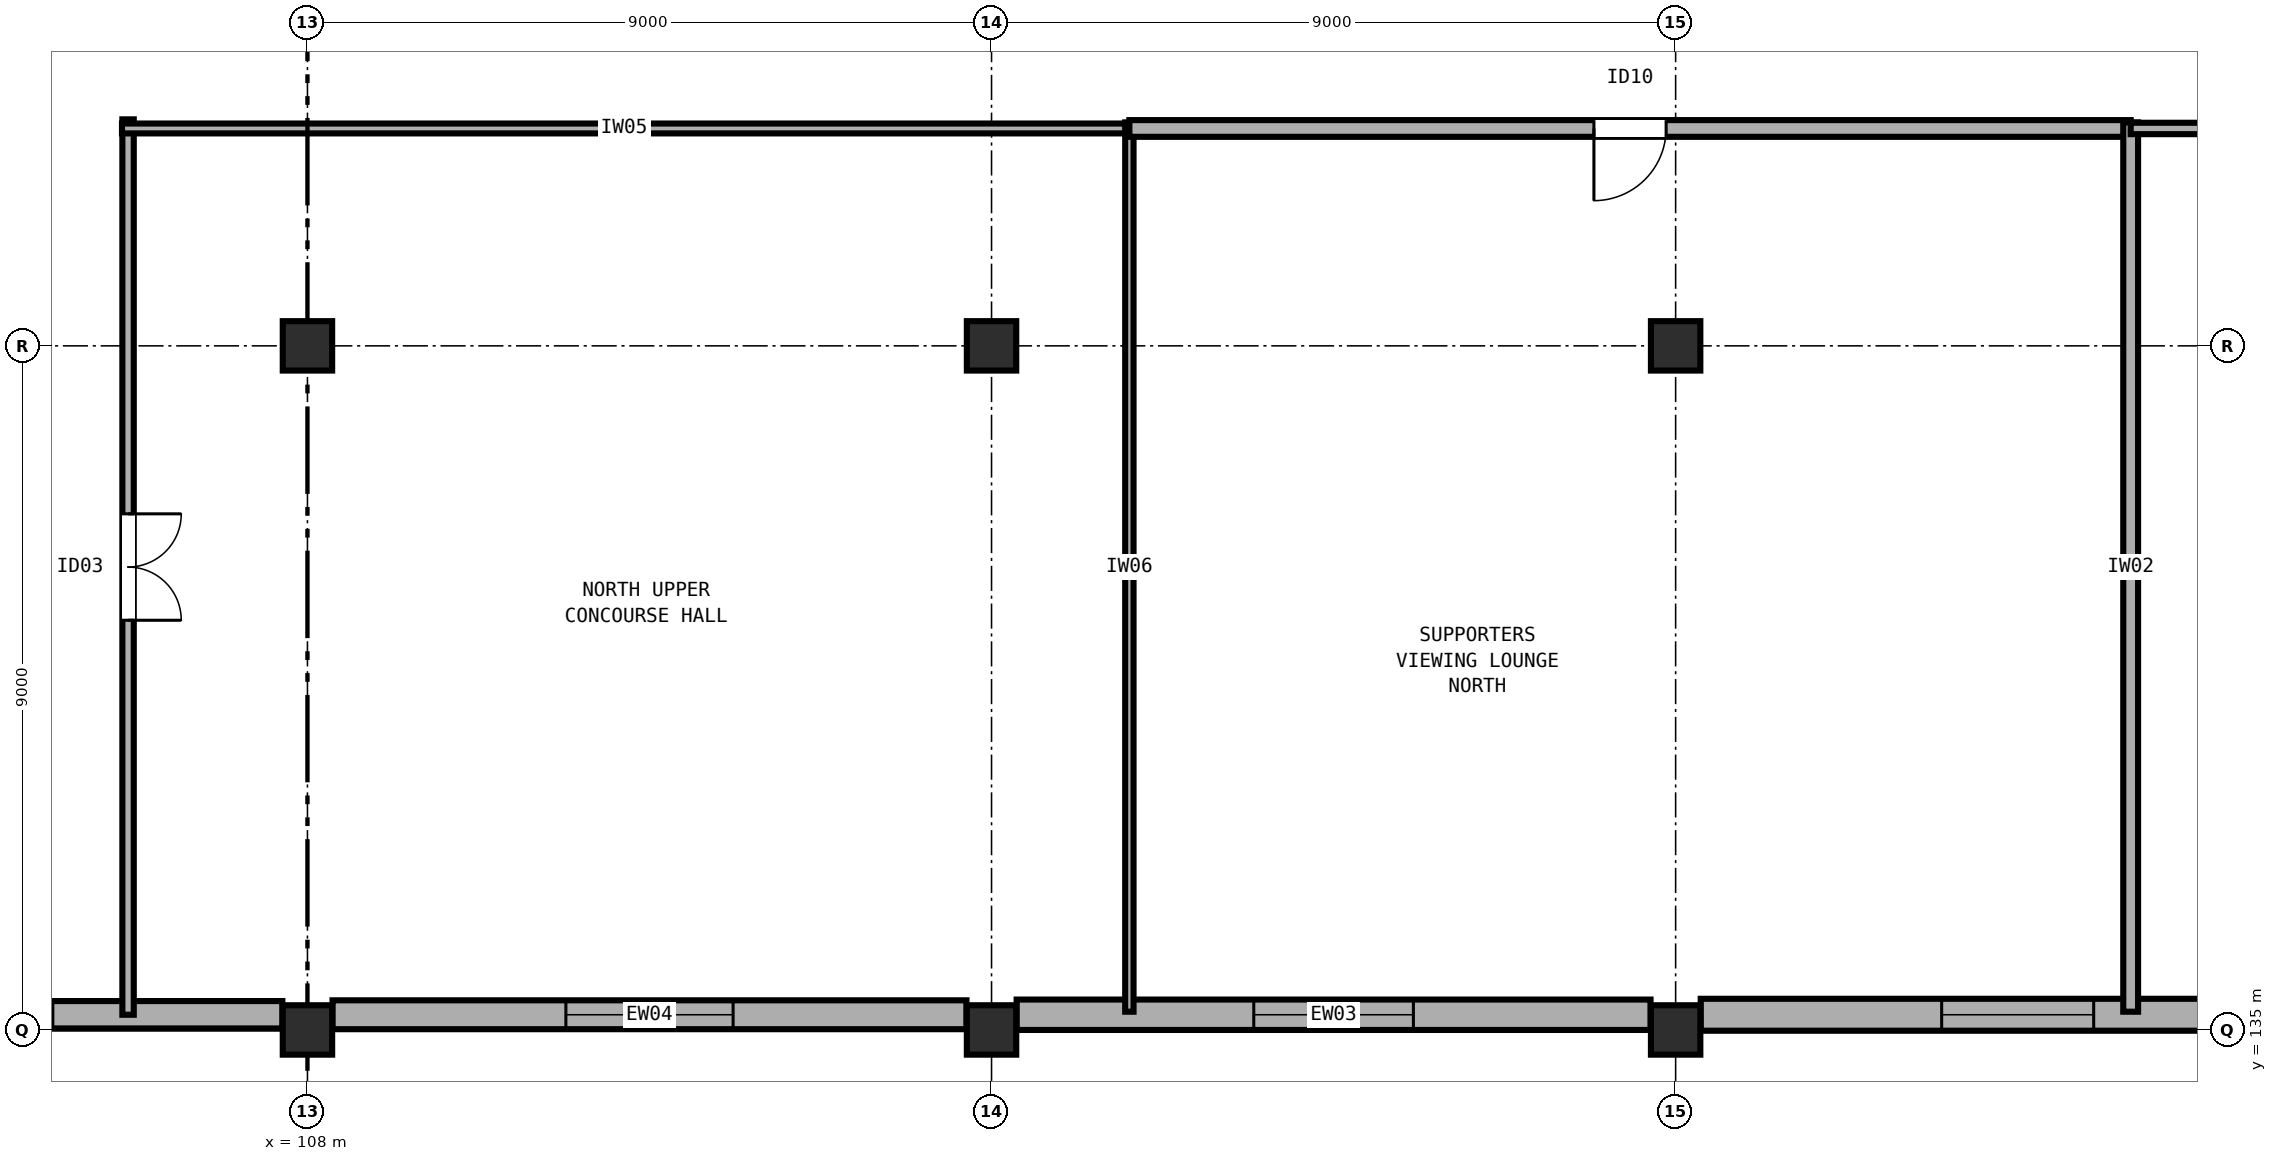
"""IFC4 building model, lengths in metres.
Left out: names, types, materials, properties, quantities, classifications, styles, units other than length and angle.
Written with IfcOpenShell. Run it as: python <this file> out.ifc"""

import sys

from ifc_helpers import new_model, si_unit, direction, frame, frame_2d, origin, origin_2d, place, context, subcontext, project, spatial, rectangle, extrude, element, fill, save


model = new_model("IFC4")
c1 = context("Model", 3, precision=1e-05, world=origin(), true_north=direction((0.0, 1.0)))
c2 = subcontext(c1, "Body", "Model", "MODEL_VIEW")
j1 = project(units=[si_unit("LENGTHUNIT", "METRE"), si_unit("PLANEANGLEUNIT", "RADIAN")], contexts=[c1])
p1 = place(None, origin())
s1 = spatial("IfcSite", under=j1, at=p1, CompositionType="ELEMENT")
p2 = place(p1, origin())
s2 = spatial("IfcBuilding", under=s1, at=p2, CompositionType="ELEMENT")
p3 = place(p2, frame((0.0, 0.0, 14.4)))
s3 = spatial("IfcBuildingStorey", under=s2, at=p3, CompositionType="ELEMENT", Elevation=14.4)
for number, where, z_axis, x_axis in (
    (1, (108.0, 135.0, 0.0), (0.0, 0.0, 1.0), (1.0, 0.0, 0.0)),
    (2, (108.0, 144.0, 0.0), (0.0, 0.0, 1.0), (1.0, 0.0, 0.0)),
    (3, (117.0, 135.0, 0.0), (0.0, 0.0, 1.0), (1.0, 0.0, 0.0)),
    (4, (117.0, 144.0, 0.0), (0.0, 0.0, 1.0), (1.0, 0.0, 0.0)),
    (5, (126.0, 135.0, 0.0), (0.0, 0.0, 1.0), (1.0, 0.0, 0.0)),
    (6, (126.0, 144.0, 0.0), (0.0, 0.0, 1.0), (1.0, 0.0, 0.0)),
):
    element("IfcColumn", number, at=place(p3, frame(where, z_axis=z_axis, x_axis=x_axis)), inside=s3, PredefinedType="COLUMN", context=c2, shape_type="SweptSolid", body=[
        extrude(rectangle(XDim=0.65, YDim=0.65, at=origin_2d()), origin(), (0.0, 0.0, 1.0), 4.8),
    ])
p4 = place(p3, frame((134.67, 135.2, 0.0), z_axis=(0.0, 0.0, 1.0), x_axis=(-1.0, 0.0, 0.0)))
e7 = element("IfcWall", 7, at=p4, inside=s3, PredefinedType="SOLIDWALL", context=c2, shape_type="SweptSolid", body=[
    extrude(rectangle(XDim=8.34, YDim=0.42, at=frame_2d((4.17, 0.0))), origin(), (0.0, 0.0, 1.0), 3.58),
])
p5 = place(p4, frame((3.17, 0.0, 0.9)))
e8 = element("IfcOpeningElement", 8, at=p5, cuts=e7, PredefinedType="OPENING", context=c2, shape_type="SweptSolid", body=[
    extrude(rectangle(XDim=2.0, YDim=1.85, at=frame_2d((1.0, 0.925))), frame((0.0, 0.22, 0.0), z_axis=(0.0, -1.0, 0.0), x_axis=(1.0, 0.0, 0.0)), (0.0, 0.0, 1.0), 0.44),
])
p6 = place(p3, frame((125.67, 135.2, 0.0), z_axis=(0.0, 0.0, 1.0), x_axis=(-1.0, 0.0, 0.0)))
e9 = element("IfcWall", 9, at=p6, inside=s3, PredefinedType="SOLIDWALL", context=c2, shape_type="SweptSolid", body=[
    extrude(rectangle(XDim=8.34, YDim=0.4, at=frame_2d((4.17, 0.0))), origin(), (0.0, 0.0, 1.0), 3.58),
])
p7 = place(p6, frame((3.12, 0.0, 0.9)))
e10 = element("IfcOpeningElement", 10, at=p7, cuts=e9, PredefinedType="OPENING", context=c2, shape_type="SweptSolid", body=[
    extrude(rectangle(XDim=2.1, YDim=1.9, at=frame_2d((1.05, 0.95))), frame((0.0, 0.21, 0.0), z_axis=(0.0, -1.0, 0.0), x_axis=(1.0, 0.0, 0.0)), (0.0, 0.0, 1.0), 0.42),
])
p8 = place(p3, frame((116.67, 135.2, 0.0), z_axis=(0.0, 0.0, 1.0), x_axis=(-1.0, 0.0, 0.0)))
e11 = element("IfcWall", 11, at=p8, inside=s3, PredefinedType="SOLIDWALL", context=c2, shape_type="SweptSolid", body=[
    extrude(rectangle(XDim=8.34, YDim=0.38, at=frame_2d((4.17, 0.0))), origin(), (0.0, 0.0, 1.0), 3.58),
])
p9 = place(p8, frame((3.07, 0.0, 0.9)))
e12 = element("IfcOpeningElement", 12, at=p9, cuts=e11, PredefinedType="OPENING", context=c2, shape_type="SweptSolid", body=[
    extrude(rectangle(XDim=2.2, YDim=1.95, at=frame_2d((1.1, 0.975))), frame((0.0, 0.2, 0.0), z_axis=(0.0, -1.0, 0.0), x_axis=(1.0, 0.0, 0.0)), (0.0, 0.0, 1.0), 0.4),
])
p10 = place(p3, frame((107.67, 135.2, 0.0), z_axis=(0.0, 0.0, 1.0), x_axis=(-1.0, 0.0, 0.0)))
e13 = element("IfcWall", 13, at=p10, inside=s3, PredefinedType="SOLIDWALL", context=c2, shape_type="SweptSolid", body=[
    extrude(rectangle(XDim=8.34, YDim=0.36, at=frame_2d((4.17, 0.0))), origin(), (0.0, 0.0, 1.0), 3.58),
])
p11 = place(p10, frame((3.02, 0.0, 0.9)))
e14 = element("IfcOpeningElement", 14, at=p11, cuts=e13, PredefinedType="OPENING", context=c2, shape_type="SweptSolid", body=[
    extrude(rectangle(XDim=2.3, YDim=2.0, at=frame_2d((1.15, 1.0))), frame((0.0, 0.19, 0.0), z_axis=(0.0, -1.0, 0.0), x_axis=(1.0, 0.0, 0.0)), (0.0, 0.0, 1.0), 0.38),
])
p12 = place(p3, frame((105.64, 146.98, 0.0), z_axis=(0.0, 0.0, 1.0), x_axis=(0.0, -1.0, 0.0)))
e15 = element("IfcWall", 15, at=p12, inside=s3, PredefinedType="PARTITIONING", context=c2, shape_type="SweptSolid", body=[
    extrude(rectangle(XDim=11.78, YDim=0.15, at=frame_2d((5.89, 0.0))), origin(), (0.0, 0.0, 1.0), 3.56),
])
p13 = place(p12, frame((5.19, 0.0, 0.0)))
e16 = element("IfcOpeningElement", 16, at=p13, cuts=e15, PredefinedType="OPENING", context=c2, shape_type="SweptSolid", body=[
    extrude(rectangle(XDim=1.4, YDim=2.15, at=frame_2d((0.7, 1.075))), frame((0.0, 0.085, 0.0), z_axis=(0.0, -1.0, 0.0), x_axis=(1.0, 0.0, 0.0)), (0.0, 0.0, 1.0), 0.17),
])
p14 = place(p3, frame((105.56, 146.86, 0.0), z_axis=(0.0, 0.0, 1.0), x_axis=(1.0, 0.0, 0.0)))
e17 = element("IfcWall", 17, at=p14, inside=s3, PredefinedType="PARTITIONING", context=c2, shape_type="SweptSolid", body=[
    extrude(rectangle(XDim=13.213, YDim=0.13, at=frame_2d((6.606, 0.0))), origin(), (0.0, 0.0, 1.0), 3.56),
])
p15 = place(p3, frame((118.813, 146.94, 0.0), z_axis=(0.0, 0.0, 1.0), x_axis=(0.0, -1.0, 0.0)))
e18 = element("IfcWall", 18, at=p15, inside=s3, PredefinedType="PARTITIONING", context=c2, shape_type="SweptSolid", body=[
    extrude(rectangle(XDim=11.7, YDim=0.11, at=frame_2d((5.85, 0.0))), origin(), (0.0, 0.0, 1.0), 3.56),
])
p16 = place(p3, frame((131.987, 146.86, 0.0), z_axis=(0.0, 0.0, 1.0), x_axis=(-1.0, 0.0, 0.0)))
e19 = element("IfcWall", 19, at=p16, inside=s3, PredefinedType="PARTITIONING", context=c2, shape_type="SweptSolid", body=[
    extrude(rectangle(XDim=13.174, YDim=0.22, at=frame_2d((6.587, 0.0))), origin(), (0.0, 0.0, 1.0), 3.56),
])
p17 = place(p16, frame((6.112, 0.0, 0.0)))
e20 = element("IfcOpeningElement", 20, at=p17, cuts=e19, PredefinedType="OPENING", context=c2, shape_type="SweptSolid", body=[
    extrude(rectangle(XDim=0.95, YDim=2.18, at=frame_2d((0.475, 1.09))), frame((0.0, 0.12, 0.0), z_axis=(0.0, -1.0, 0.0), x_axis=(1.0, 0.0, 0.0)), (0.0, 0.0, 1.0), 0.24),
])
p18 = place(p3, frame((131.987, 146.94, 0.0), z_axis=(0.0, 0.0, 1.0), x_axis=(0.0, -1.0, 0.0)))
e21 = element("IfcWall", 21, at=p18, inside=s3, PredefinedType="PARTITIONING", context=c2, shape_type="SweptSolid", body=[
    extrude(rectangle(XDim=11.7, YDim=0.195, at=frame_2d((5.85, 0.0))), origin(), (0.0, 0.0, 1.0), 3.56),
])
p19 = place(p3, frame((145.28, 146.86, 0.0), z_axis=(0.0, 0.0, 1.0), x_axis=(-1.0, 0.0, 0.0)))
e22 = element("IfcWall", 22, at=p19, inside=s3, PredefinedType="PARTITIONING", context=c2, shape_type="SweptSolid", body=[
    extrude(rectangle(XDim=13.293, YDim=0.15, at=frame_2d((6.646, 0.0))), origin(), (0.0, 0.0, 1.0), 3.56),
])
p20 = place(p19, frame((6.022, 0.0, 0.0)))
e23 = element("IfcOpeningElement", 23, at=p20, cuts=e22, PredefinedType="OPENING", context=c2, shape_type="SweptSolid", body=[
    extrude(rectangle(XDim=1.25, YDim=2.15, at=frame_2d((0.625, 1.075))), frame((0.0, 0.085, 0.0), z_axis=(0.0, -1.0, 0.0), x_axis=(1.0, 0.0, 0.0)), (0.0, 0.0, 1.0), 0.17),
])
p21 = place(p5, origin())
e24 = element("IfcWindow", 24, at=p21, inside=s3, PartitioningType="DOUBLE_PANEL_VERTICAL", PredefinedType="WINDOW", context=c2, shape_type="SweptSolid", body=[
    extrude(rectangle(XDim=2.0, YDim=1.85, at=frame_2d((1.0, 0.925))), frame((0.0, 0.03, 0.0), z_axis=(0.0, -1.0, 0.0), x_axis=(1.0, 0.0, 0.0)), (0.0, 0.0, 1.0), 0.06),
])
fill(e8, e24)
p22 = place(p7, origin())
e25 = element("IfcWindow", 25, at=p22, inside=s3, PartitioningType="DOUBLE_PANEL_VERTICAL", PredefinedType="WINDOW", context=c2, shape_type="SweptSolid", body=[
    extrude(rectangle(XDim=2.1, YDim=1.9, at=frame_2d((1.05, 0.95))), frame((0.0, 0.03, 0.0), z_axis=(0.0, -1.0, 0.0), x_axis=(1.0, 0.0, 0.0)), (0.0, 0.0, 1.0), 0.06),
])
fill(e10, e25)
p23 = place(p9, origin())
e26 = element("IfcWindow", 26, at=p23, inside=s3, PartitioningType="DOUBLE_PANEL_VERTICAL", PredefinedType="WINDOW", context=c2, shape_type="SweptSolid", body=[
    extrude(rectangle(XDim=2.2, YDim=1.95, at=frame_2d((1.1, 0.975))), frame((0.0, 0.03, 0.0), z_axis=(0.0, -1.0, 0.0), x_axis=(1.0, 0.0, 0.0)), (0.0, 0.0, 1.0), 0.06),
])
fill(e12, e26)
p24 = place(p11, origin())
e27 = element("IfcWindow", 27, at=p24, inside=s3, PartitioningType="DOUBLE_PANEL_VERTICAL", PredefinedType="WINDOW", context=c2, shape_type="SweptSolid", body=[
    extrude(rectangle(XDim=2.3, YDim=2.0, at=frame_2d((1.15, 1.0))), frame((0.0, 0.03, 0.0), z_axis=(0.0, -1.0, 0.0), x_axis=(1.0, 0.0, 0.0)), (0.0, 0.0, 1.0), 0.06),
])
fill(e14, e27)
p25 = place(p13, origin())
e28 = element("IfcDoor", 28, at=p25, inside=s3, OperationType="DOUBLE_DOOR_SINGLE_SWING", PredefinedType="DOOR", context=c2, shape_type="SweptSolid", body=[
    extrude(rectangle(XDim=1.4, YDim=2.15, at=frame_2d((0.7, 1.075))), frame((0.0, 0.025, 0.0), z_axis=(0.0, -1.0, 0.0), x_axis=(1.0, 0.0, 0.0)), (0.0, 0.0, 1.0), 0.05),
])
fill(e16, e28)
p26 = place(p17, origin())
e29 = element("IfcDoor", 29, at=p26, inside=s3, OperationType="SINGLE_SWING_RIGHT", PredefinedType="DOOR", context=c2, shape_type="SweptSolid", body=[
    extrude(rectangle(XDim=0.95, YDim=2.18, at=frame_2d((0.475, 1.09))), frame((0.0, 0.025, 0.0), z_axis=(0.0, -1.0, 0.0), x_axis=(1.0, 0.0, 0.0)), (0.0, 0.0, 1.0), 0.05),
])
fill(e20, e29)
save(model, sys.argv[1])
